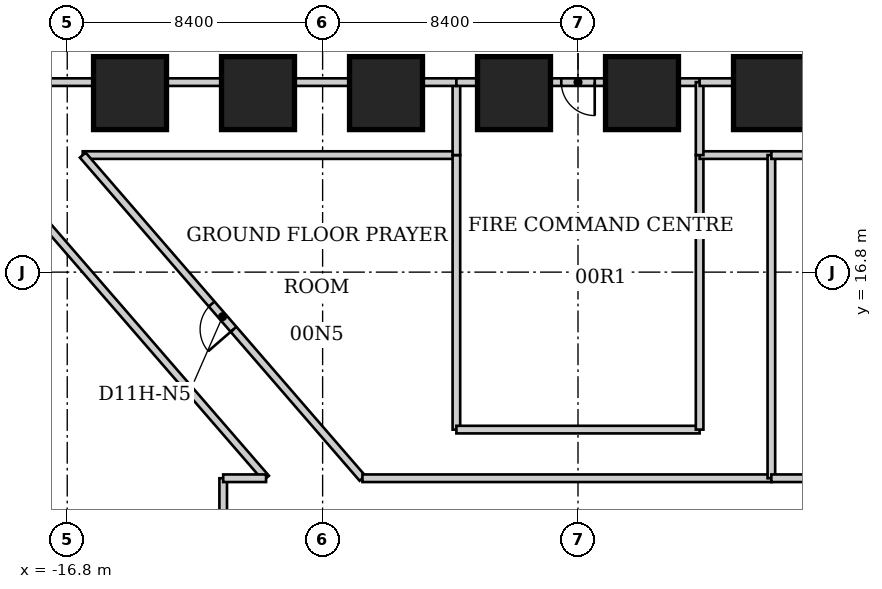
"""IFC4 building model, lengths in metres.
Left out: names, types, materials, properties, quantities, classifications, styles, units other than length and angle.
Written with IfcOpenShell. Run it as: python <this file> out.ifc"""

import sys

from ifc_helpers import new_model, si_unit, direction, frame, frame_2d, origin, origin_2d, place, context, subcontext, project, spatial, rectangle, extrude, element, fill, save


model = new_model("IFC4")
c1 = context("Model", 3, precision=1e-05, world=origin(), true_north=direction((0.0, 1.0)))
c2 = subcontext(c1, "Body", "Model", "MODEL_VIEW")
j1 = project(units=[si_unit("LENGTHUNIT", "METRE"), si_unit("PLANEANGLEUNIT", "RADIAN")], contexts=[c1])
p1 = place(None, origin())
s1 = spatial("IfcSite", under=j1, at=p1, CompositionType="ELEMENT")
p2 = place(p1, origin())
s2 = spatial("IfcBuilding", under=s1, at=p2, CompositionType="ELEMENT")
p3 = place(p2, origin())
s3 = spatial("IfcBuildingStorey", under=s2, at=p3, CompositionType="ELEMENT", Elevation=0.0)
for number, where, z_axis, x_axis in (
    (1, (-14.735, 22.689, -0.2), (0.0, 0.0, 1.0), (0.0, 1.0, 0.0)),
    (2, (-10.525, 22.689, -0.2), (0.0, 0.0, 1.0), (0.0, 1.0, 0.0)),
    (3, (-6.315, 22.689, -0.2), (0.0, 0.0, 1.0), (0.0, 1.0, 0.0)),
    (4, (-2.105, 22.689, -0.2), (0.0, 0.0, 1.0), (0.0, 1.0, 0.0)),
    (5, (2.105, 22.689, -0.2), (0.0, 0.0, 1.0), (0.0, 1.0, 0.0)),
    (6, (6.315, 22.689, -0.2), (0.0, 0.0, 1.0), (0.0, 1.0, 0.0)),
):
    element("IfcColumn", number, at=place(p3, frame(where, z_axis=z_axis, x_axis=x_axis)), inside=s3, PredefinedType="COLUMN", context=c2, shape_type="SweptSolid", body=[
        extrude(rectangle(XDim=2.4, YDim=2.4, at=origin_2d()), origin(), (0.0, 0.0, 1.0), 6.2),
    ])
p4 = place(p3, frame((-19.14, 20.27, 0.0), z_axis=(0.0, 0.0, 1.0), x_axis=(0.654785227324, -0.755814994611, 0.0)))
e7 = element("IfcWall", 7, at=p4, inside=s3, PredefinedType="PARTITIONING", context=c2, shape_type="SweptSolid", body=[
    extrude(rectangle(XDim=13.562, YDim=0.25, at=frame_2d((6.781, 0.0))), origin(), (0.0, 0.0, 1.0), 5.84),
])
p5 = place(p3, frame((-16.29, 20.65, 0.0), z_axis=(0.0, 0.0, 1.0), x_axis=(1.0, 0.0, 0.0)))
e8 = element("IfcWall", 8, at=p5, inside=s3, PredefinedType="PARTITIONING", context=c2, shape_type="SweptSolid", body=[
    extrude(rectangle(XDim=12.29, YDim=0.25, at=frame_2d((6.145, 0.0))), origin(), (0.0, 0.0, 1.0), 5.84),
])
p6 = place(p3, frame((-11.67, 10.02, 0.0), z_axis=(0.0, 0.0, 1.0), x_axis=(0.0, -1.0, 0.0)))
e9 = element("IfcWall", 9, at=p6, inside=s3, PredefinedType="PARTITIONING", context=c2, shape_type="SweptSolid", body=[
    extrude(rectangle(XDim=21.13, YDim=0.25, at=frame_2d((10.565, 0.0))), origin(), (0.0, 0.0, 1.0), 5.84),
])
p7 = place(p3, frame((-10.26, 10.02, 0.0), z_axis=(0.0, 0.0, 1.0), x_axis=(-1.0, 0.0, 0.0)))
e10 = element("IfcWall", 10, at=p7, inside=s3, PredefinedType="PARTITIONING", context=c2, shape_type="SweptSolid", body=[
    extrude(rectangle(XDim=1.41, YDim=0.25, at=frame_2d((0.705, 0.0))), origin(), (0.0, 0.0, 1.0), 5.84),
])
p8 = place(p3, frame((-7.09, 10.02, 0.0), z_axis=(0.0, 0.0, 1.0), x_axis=(-0.654417990957, 0.756132986393, 0.0)))
e11 = element("IfcWall", 11, at=p8, inside=s3, PredefinedType="PARTITIONING", context=c2, shape_type="SweptSolid", body=[
    extrude(rectangle(XDim=14.058, YDim=0.25, at=frame_2d((7.029, 0.0))), origin(), (0.0, 0.0, 1.0), 5.84),
])
p9 = place(p8, frame((6.479, 0.0, 0.0)))
e12 = element("IfcOpeningElement", 12, at=p9, cuts=e11, PredefinedType="OPENING", context=c2, shape_type="SweptSolid", body=[
    extrude(rectangle(XDim=1.1, YDim=2.2, at=frame_2d((0.55, 1.1))), frame((0.0, 0.125, 0.0), z_axis=(0.0, -1.0, 0.0), x_axis=(1.0, 0.0, 0.0)), (0.0, 0.0, 1.0), 0.25),
])
p10 = place(p3, frame((-4.0, 11.62, 0.0), z_axis=(0.0, 0.0, 1.0), x_axis=(0.0, 1.0, 0.0)))
e13 = element("IfcWall", 13, at=p10, inside=s3, PredefinedType="PARTITIONING", context=c2, shape_type="SweptSolid", body=[
    extrude(rectangle(XDim=9.03, YDim=0.25, at=frame_2d((4.515, 0.0))), origin(), (0.0, 0.0, 1.0), 5.84),
])
p11 = place(p3, frame((-4.0, 20.65, 0.0), z_axis=(0.0, 0.0, 1.0), x_axis=(0.0, 1.0, 0.0)))
e14 = element("IfcWall", 14, at=p11, inside=s3, PredefinedType="PARTITIONING", context=c2, shape_type="SweptSolid", body=[
    extrude(rectangle(XDim=2.4, YDim=0.25, at=frame_2d((1.2, 0.0))), origin(), (0.0, 0.0, 1.0), 5.84),
])
p12 = place(p3, frame((-4.0, 23.05, 0.0), z_axis=(0.0, 0.0, 1.0), x_axis=(-1.0, 0.0, 0.0)))
e15 = element("IfcWall", 15, at=p12, inside=s3, PredefinedType="PARTITIONING", context=c2, shape_type="SweptSolid", body=[
    extrude(rectangle(XDim=15.15, YDim=0.25, at=frame_2d((7.575, 0.0))), origin(), (0.0, 0.0, 1.0), 4.04),
])
p13 = place(p3, frame((4.0, 11.62, 0.0), z_axis=(0.0, 0.0, 1.0), x_axis=(-1.0, 0.0, 0.0)))
e16 = element("IfcWall", 16, at=p13, inside=s3, PredefinedType="PARTITIONING", context=c2, shape_type="SweptSolid", body=[
    extrude(rectangle(XDim=8.0, YDim=0.25, at=frame_2d((4.0, 0.0))), origin(), (0.0, 0.0, 1.0), 5.84),
])
p14 = place(p3, frame((4.0, 20.65, 0.0), z_axis=(0.0, 0.0, 1.0), x_axis=(0.0, -1.0, 0.0)))
e17 = element("IfcWall", 17, at=p14, inside=s3, PredefinedType="PARTITIONING", context=c2, shape_type="SweptSolid", body=[
    extrude(rectangle(XDim=9.03, YDim=0.25, at=frame_2d((4.515, 0.0))), origin(), (0.0, 0.0, 1.0), 5.84),
])
p15 = place(p3, frame((4.0, 20.65, 0.0), z_axis=(0.0, 0.0, 1.0), x_axis=(1.0, 0.0, 0.0)))
e18 = element("IfcWall", 18, at=p15, inside=s3, PredefinedType="PARTITIONING", context=c2, shape_type="SweptSolid", body=[
    extrude(rectangle(XDim=2.36, YDim=0.25, at=frame_2d((1.18, 0.0))), origin(), (0.0, 0.0, 1.0), 5.84),
])
p16 = place(p3, frame((4.0, 23.05, 0.0), z_axis=(0.0, 0.0, 1.0), x_axis=(-1.0, 0.0, 0.0)))
e19 = element("IfcWall", 19, at=p16, inside=s3, PredefinedType="PARTITIONING", context=c2, shape_type="SweptSolid", body=[
    extrude(rectangle(XDim=8.0, YDim=0.25, at=frame_2d((4.0, 0.0))), origin(), (0.0, 0.0, 1.0), 4.04),
])
p17 = place(p16, frame((3.45, 0.0, 0.0)))
e20 = element("IfcOpeningElement", 20, at=p17, cuts=e19, PredefinedType="OPENING", context=c2, shape_type="SweptSolid", body=[
    extrude(rectangle(XDim=1.1, YDim=2.2, at=frame_2d((0.55, 1.1))), frame((0.0, 0.125, 0.0), z_axis=(0.0, -1.0, 0.0), x_axis=(1.0, 0.0, 0.0)), (0.0, 0.0, 1.0), 0.25),
])
p18 = place(p3, frame((4.0, 23.05, 0.0), z_axis=(0.0, 0.0, 1.0), x_axis=(0.0, -1.0, 0.0)))
e21 = element("IfcWall", 21, at=p18, inside=s3, PredefinedType="PARTITIONING", context=c2, shape_type="SweptSolid", body=[
    extrude(rectangle(XDim=2.4, YDim=0.25, at=frame_2d((1.2, 0.0))), origin(), (0.0, 0.0, 1.0), 5.84),
])
p19 = place(p3, frame((6.36, 10.02, 0.0), z_axis=(0.0, 0.0, 1.0), x_axis=(-1.0, 0.0, 0.0)))
e22 = element("IfcWall", 22, at=p19, inside=s3, PredefinedType="PARTITIONING", context=c2, shape_type="SweptSolid", body=[
    extrude(rectangle(XDim=13.45, YDim=0.25, at=frame_2d((6.725, 0.0))), origin(), (0.0, 0.0, 1.0), 5.84),
])
p20 = place(p3, frame((6.36, 10.02, 0.0), z_axis=(0.0, 0.0, 1.0), x_axis=(0.0, 1.0, 0.0)))
e23 = element("IfcWall", 23, at=p20, inside=s3, PredefinedType="PARTITIONING", context=c2, shape_type="SweptSolid", body=[
    extrude(rectangle(XDim=10.63, YDim=0.25, at=frame_2d((5.315, 0.0))), origin(), (0.0, 0.0, 1.0), 5.078),
])
p21 = place(p3, frame((6.36, 20.65, 0.0), z_axis=(0.0, 0.0, 1.0), x_axis=(1.0, 0.0, 0.0)))
e24 = element("IfcWall", 24, at=p21, inside=s3, PredefinedType="PARTITIONING", context=c2, shape_type="SweptSolid", body=[
    extrude(rectangle(XDim=12.15, YDim=0.25, at=frame_2d((6.075, 0.0))), origin(), (0.0, 0.0, 1.0), 5.84),
])
p22 = place(p3, frame((11.67, 10.02, 0.0), z_axis=(0.0, 0.0, 1.0), x_axis=(-1.0, 0.0, 0.0)))
e25 = element("IfcWall", 25, at=p22, inside=s3, PredefinedType="PARTITIONING", context=c2, shape_type="SweptSolid", body=[
    extrude(rectangle(XDim=5.31, YDim=0.25, at=frame_2d((2.655, 0.0))), origin(), (0.0, 0.0, 1.0), 5.84),
])
p23 = place(p3, frame((19.15, 23.05, 0.0), z_axis=(0.0, 0.0, 1.0), x_axis=(-1.0, 0.0, 0.0)))
e26 = element("IfcWall", 26, at=p23, inside=s3, PredefinedType="PARTITIONING", context=c2, shape_type="SweptSolid", body=[
    extrude(rectangle(XDim=15.15, YDim=0.25, at=frame_2d((7.575, 0.0))), origin(), (0.0, 0.0, 1.0), 4.04),
])
p24 = place(p17, origin())
e27 = element("IfcDoor", 27, at=p24, inside=s3, OperationType="SINGLE_SWING_LEFT", PredefinedType="DOOR", context=c2, shape_type="SweptSolid", body=[
    extrude(rectangle(XDim=1.1, YDim=2.2, at=frame_2d((0.55, 1.1))), frame((0.0, 0.025, 0.0), z_axis=(0.0, -1.0, 0.0), x_axis=(1.0, 0.0, 0.0)), (0.0, 0.0, 1.0), 0.05),
])
fill(e20, e27)
p25 = place(p9, origin())
e28 = element("IfcDoor", 28, at=p25, inside=s3, OperationType="SINGLE_SWING_LEFT", PredefinedType="DOOR", context=c2, shape_type="SweptSolid", body=[
    extrude(rectangle(XDim=1.1, YDim=2.2, at=frame_2d((0.55, 1.1))), frame((0.0, 0.025, 0.0), z_axis=(0.0, -1.0, 0.0), x_axis=(1.0, 0.0, 0.0)), (0.0, 0.0, 1.0), 0.05),
])
fill(e12, e28)
save(model, sys.argv[1])
